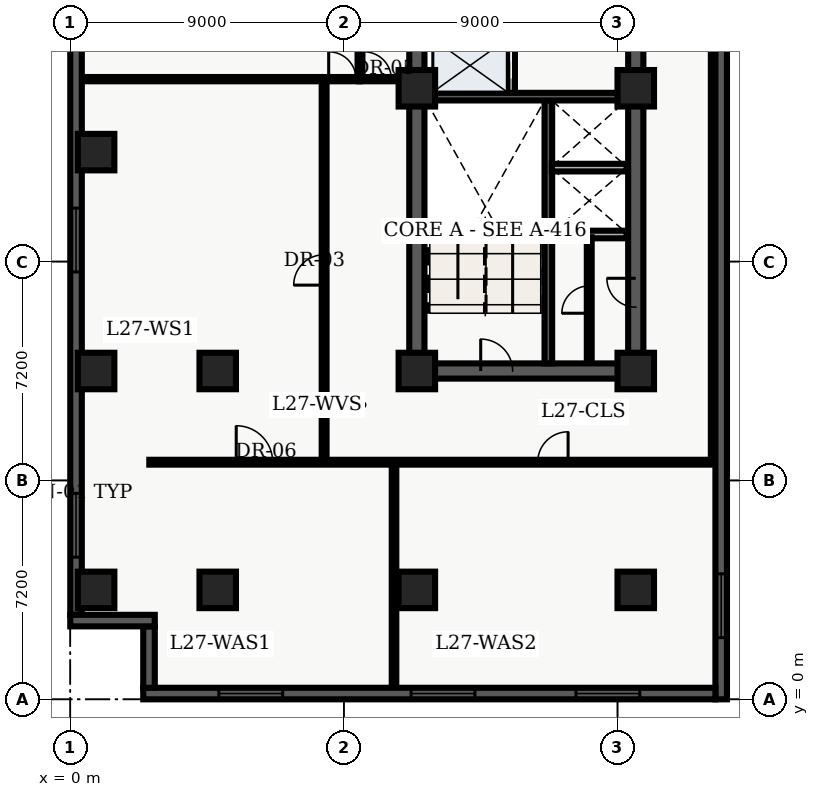
"""IFC4 building model, lengths in metres.
Left out: names, types, materials, properties, quantities, classifications, styles, units other than length and angle.
Written with IfcOpenShell. Run it as: python <this file> out.ifc"""

import sys

from ifc_helpers import new_model, entity, si_unit, converted_unit, direction, frame, origin_with_axes, origin_2d_with_axis, place, context, subcontext, project, spatial, polyline, rectangle, outline, extrude, element, fill, save


model = new_model("IFC4")
c1 = context("Model", 3, precision=1e-05, world=origin_with_axes(), true_north=direction((0.0, 1.0)))
c2 = subcontext(c1, "Body", "Model", "MODEL_VIEW")
j1 = project(units=[si_unit("LENGTHUNIT", "METRE"), converted_unit("PLANEANGLEUNIT", "DEGREE", entity("IfcPlaneAngleMeasure", 0.017), si_unit("PLANEANGLEUNIT", "RADIAN"), dimensions=[0, 0, 0, 0, 0, 0, 0])], contexts=[c1])
p1 = place(None, origin_with_axes())
s1 = spatial("IfcSite", under=j1, at=p1, CompositionType="ELEMENT")
p2 = place(p1, origin_with_axes())
s2 = spatial("IfcBuilding", under=s1, at=p2, CompositionType="ELEMENT")
p3 = place(p2, frame((0.0, 0.0, 112.5), z_axis=(0.0, 0.0, 1.0), x_axis=(1.0, 0.0, 0.0)))
s3 = spatial("IfcBuildingStorey", under=s2, at=p3, CompositionType="ELEMENT", Elevation=112.5)
p4 = place(p3, frame((11.4, 10.8, 0.0), z_axis=(0.0, 0.0, 1.0), x_axis=(0.0, 1.0, 0.0)))
e1 = element("IfcWall", 1, at=p4, inside=s3, PredefinedType="SHEAR", context=c2, shape_type="SweptSolid", body=[
    extrude(outline(polyline([(0.0, -0.25), (27.0, -0.25), (27.0, 0.25), (0.0, 0.25), (0.0, -0.25)])), origin_with_axes(), (0.0, 0.0, 1.0), 3.66),
])
p5 = place(p3, frame((11.4, 10.8, 0.0), z_axis=(0.0, 0.0, 1.0), x_axis=(1.0, 0.0, 0.0)))
e2 = element("IfcWall", 2, at=p5, inside=s3, PredefinedType="SHEAR", context=c2, shape_type="SweptSolid", body=[
    extrude(outline(polyline([(0.0, -0.25), (7.2, -0.25), (7.2, 0.25), (0.0, 0.25), (0.0, -0.25)])), origin_with_axes(), (0.0, 0.0, 1.0), 3.66),
])
p6 = place(p5, frame((2.625, 0.0, 0.0), z_axis=(0.0, 0.0, 1.0), x_axis=(1.0, 0.0, 0.0)))
e3 = element("IfcOpeningElement", 3, at=p6, cuts=e2, PredefinedType="OPENING", context=c2, shape_type="SweptSolid", body=[
    extrude(rectangle(XDim=1.05, YDim=0.52, at=origin_2d_with_axis()), origin_with_axes(), (0.0, 0.0, 1.0), 2.15),
])
p7 = place(p3, frame((18.6, 10.8, 0.0), z_axis=(0.0, 0.0, 1.0), x_axis=(0.0, 1.0, 0.0)))
e4 = element("IfcWall", 4, at=p7, inside=s3, PredefinedType="SHEAR", context=c2, shape_type="SweptSolid", body=[
    extrude(outline(polyline([(0.0, -0.25), (13.5, -0.25), (13.5, 0.25), (0.0, 0.25), (0.0, -0.25)])), origin_with_axes(), (0.0, 0.0, 1.0), 3.66),
])
p8 = place(p7, frame((11.125, 0.0, 0.0), z_axis=(0.0, 0.0, 1.0), x_axis=(1.0, 0.0, 0.0)))
e5 = element("IfcOpeningElement", 5, at=p8, cuts=e4, PredefinedType="OPENING", context=c2, shape_type="SweptSolid", body=[
    extrude(rectangle(XDim=1.05, YDim=0.52, at=origin_2d_with_axis()), origin_with_axes(), (0.0, 0.0, 1.0), 2.15),
])
p9 = place(p7, frame((2.575, 0.0, 0.0), z_axis=(0.0, 0.0, 1.0), x_axis=(1.0, 0.0, 0.0)))
e6 = element("IfcOpeningElement", 6, at=p9, cuts=e4, PredefinedType="OPENING", context=c2, shape_type="SweptSolid", body=[
    extrude(rectangle(XDim=0.95, YDim=0.52, at=origin_2d_with_axis()), origin_with_axes(), (0.0, 0.0, 1.0), 2.15),
])
p10 = place(p3, frame((15.725, 11.05, 0.0), z_axis=(0.0, 0.0, 1.0), x_axis=(0.0, 1.0, 0.0)))
e7 = element("IfcWall", 7, at=p10, inside=s3, PredefinedType="SHEAR", context=c2, shape_type="SweptSolid", body=[
    extrude(outline(polyline([(0.0, -0.125), (8.65, -0.125), (8.65, 0.125), (0.0, 0.125), (0.0, -0.125)])), origin_with_axes(), (0.0, 0.0, 1.0), 3.66),
])
p11 = place(p3, frame((11.65, 19.825, 0.0), z_axis=(0.0, 0.0, 1.0), x_axis=(1.0, 0.0, 0.0)))
e8 = element("IfcWall", 8, at=p11, inside=s3, PredefinedType="SHEAR", context=c2, shape_type="SweptSolid", body=[
    extrude(outline(polyline([(0.0, -0.125), (6.7, -0.125), (6.7, 0.125), (0.0, 0.125), (0.0, -0.125)])), origin_with_axes(), (0.0, 0.0, 1.0), 3.66),
])
p12 = place(p3, frame((14.5, 19.95, 0.0), z_axis=(0.0, 0.0, 1.0), x_axis=(0.0, 1.0, 0.0)))
e9 = element("IfcWall", 9, at=p12, inside=s3, PredefinedType="SOLIDWALL", context=c2, shape_type="SweptSolid", body=[
    extrude(outline(polyline([(0.0, -0.125), (6.25, -0.125), (6.25, 0.125), (0.0, 0.125), (0.0, -0.125)])), origin_with_axes(), (0.0, 0.0, 1.0), 2.7),
])
p13 = place(p12, frame((1.025, 0.0, 0.0), z_axis=(0.0, 0.0, 1.0), x_axis=(1.0, 0.0, 0.0)))
e10 = element("IfcOpeningElement", 10, at=p13, cuts=e9, PredefinedType="OPENING", context=c2, shape_type="SweptSolid", body=[
    extrude(rectangle(XDim=1.1, YDim=0.27, at=origin_2d_with_axis()), origin_with_axes(), (0.0, 0.0, 1.0), 2.15),
])
p14 = place(p12, frame((2.975, 0.0, 0.0), z_axis=(0.0, 0.0, 1.0), x_axis=(1.0, 0.0, 0.0)))
e11 = element("IfcOpeningElement", 11, at=p14, cuts=e9, PredefinedType="OPENING", context=c2, shape_type="SweptSolid", body=[
    extrude(rectangle(XDim=1.1, YDim=0.27, at=origin_2d_with_axis()), origin_with_axes(), (0.0, 0.0, 1.0), 2.15),
])
p15 = place(p12, frame((5.425, 0.0, 0.0), z_axis=(0.0, 0.0, 1.0), x_axis=(1.0, 0.0, 0.0)))
e12 = element("IfcOpeningElement", 12, at=p15, cuts=e9, PredefinedType="OPENING", context=c2, shape_type="SweptSolid", body=[
    extrude(rectangle(XDim=1.2, YDim=0.27, at=origin_2d_with_axis()), origin_with_axes(), (0.0, 0.0, 1.0), 2.15),
])
for number, where, z_axis, x_axis in (
    (13, (11.4, 3.6, 0.0), (0.0, 0.0, 1.0), (1.0, 0.0, 0.0)),
    (14, (11.4, 10.8, 0.0), (0.0, 0.0, 1.0), (1.0, 0.0, 0.0)),
    (15, (11.4, 20.1, 0.0), (0.0, 0.0, 1.0), (1.0, 0.0, 0.0)),
    (16, (18.6, 3.6, 0.0), (0.0, 0.0, 1.0), (1.0, 0.0, 0.0)),
    (17, (18.6, 10.8, 0.0), (0.0, 0.0, 1.0), (1.0, 0.0, 0.0)),
    (18, (18.6, 20.1, 0.0), (0.0, 0.0, 1.0), (1.0, 0.0, 0.0)),
    (19, (4.85, 3.6, 0.0), (0.0, 0.0, 1.0), (1.0, 0.0, 0.0)),
    (20, (4.85, 10.8, 0.0), (0.0, 0.0, 1.0), (1.0, 0.0, 0.0)),
    (21, (0.85, 3.6, 0.0), (0.0, 0.0, 1.0), (1.0, 0.0, 0.0)),
    (22, (0.85, 10.8, 0.0), (0.0, 0.0, 1.0), (1.0, 0.0, 0.0)),
    (23, (0.85, 18.0, 0.0), (0.0, 0.0, 1.0), (1.0, 0.0, 0.0)),
):
    element("IfcColumn", number, at=place(p3, frame(where, z_axis=z_axis, x_axis=x_axis)), inside=s3, PredefinedType="COLUMN", context=c2, shape_type="SweptSolid", body=[
        extrude(rectangle(XDim=1.2, YDim=1.2, at=origin_2d_with_axis()), origin_with_axes(), (0.0, 0.0, 1.0), 3.9),
    ])
for number, where, z_axis, x_axis in (
    (24, (15.84, 15.29, 0.0), (0.0, 0.0, 1.0), (1.0, 0.0, 0.0)),
    (25, (15.84, 17.49, 0.0), (0.0, 0.0, 1.0), (1.0, 0.0, 0.0)),
):
    element("IfcWall", number, at=place(p3, frame(where, z_axis=z_axis, x_axis=x_axis)), inside=s3, PredefinedType="SOLIDWALL", context=c2, shape_type="SweptSolid", body=[
        extrude(outline(polyline([(0.0, -0.125), (2.46, -0.125), (2.46, 0.125), (0.0, 0.125), (0.0, -0.125)])), origin_with_axes(), (0.0, 0.0, 1.0), 2.7),
    ])
p16 = place(p3, frame((17.07, 11.1, 0.0), z_axis=(0.0, 0.0, 1.0), x_axis=(0.0, 1.0, 0.0)))
e26 = element("IfcWall", 26, at=p16, inside=s3, PredefinedType="PARTITIONING", context=c2, shape_type="SweptSolid", body=[
    extrude(outline(polyline([(0.0, -0.08), (4.1, -0.08), (4.1, 0.08), (0.0, 0.08), (0.0, -0.08)])), origin_with_axes(), (0.0, 0.0, 1.0), 2.7),
])
p17 = place(p16, frame((2.05, 0.0, 0.0), z_axis=(0.0, 0.0, 1.0), x_axis=(1.0, 0.0, 0.0)))
e27 = element("IfcOpeningElement", 27, at=p17, cuts=e26, PredefinedType="OPENING", context=c2, shape_type="SweptSolid", body=[
    extrude(rectangle(XDim=0.9, YDim=0.18, at=origin_2d_with_axis()), origin_with_axes(), (0.0, 0.0, 1.0), 2.15),
])
p18 = place(p3, frame((9.52, 20.4, 0.0), z_axis=(0.0, 0.0, 1.0), x_axis=(0.0, 1.0, 0.0)))
e28 = element("IfcWall", 28, at=p18, inside=s3, PredefinedType="PARTITIONING", context=c2, shape_type="SweptSolid", body=[
    extrude(outline(polyline([(0.0, -0.07), (4.0, -0.07), (4.0, 0.07), (0.0, 0.07), (0.0, -0.07)])), origin_with_axes(), (0.0, 0.0, 1.0), 2.7),
])
p19 = place(p3, frame((9.52, 20.4, 0.0), z_axis=(0.0, 0.0, 1.0), x_axis=(1.0, 0.0, 0.0)))
e29 = element("IfcWall", 29, at=p19, inside=s3, PredefinedType="PARTITIONING", context=c2, shape_type="SweptSolid", body=[
    extrude(outline(polyline([(0.0, -0.07), (1.58, -0.07), (1.58, 0.07), (0.0, 0.07), (0.0, -0.07)])), origin_with_axes(), (0.0, 0.0, 1.0), 2.7),
])
p20 = place(p19, frame((0.59, 0.0, 0.0), z_axis=(0.0, 0.0, 1.0), x_axis=(1.0, 0.0, 0.0)))
e30 = element("IfcOpeningElement", 30, at=p20, cuts=e29, PredefinedType="OPENING", context=c2, shape_type="SweptSolid", body=[
    extrude(rectangle(XDim=0.9, YDim=0.16, at=origin_2d_with_axis()), origin_with_axes(), (0.0, 0.0, 1.0), 2.15),
])
p21 = place(p3, frame((2.6, 7.8, 0.0), z_axis=(0.0, 0.0, 1.0), x_axis=(1.0, 0.0, 0.0)))
e31 = element("IfcWall", 31, at=p21, inside=s3, PredefinedType="PARTITIONING", context=c2, shape_type="SweptSolid", body=[
    extrude(outline(polyline([(0.0, -0.08), (18.625, -0.08), (18.625, 0.08), (0.0, 0.08), (0.0, -0.08)])), origin_with_axes(), (0.0, 0.0, 1.0), 2.7),
])
p22 = place(p21, frame((3.459, 0.0, 0.0), z_axis=(0.0, 0.0, 1.0), x_axis=(1.0, 0.0, 0.0)))
e32 = element("IfcOpeningElement", 32, at=p22, cuts=e31, PredefinedType="OPENING", context=c2, shape_type="SweptSolid", body=[
    extrude(rectangle(XDim=1.2, YDim=0.18, at=origin_2d_with_axis()), origin_with_axes(), (0.0, 0.0, 1.0), 2.2),
])
p23 = place(p21, frame((13.274, 0.0, 0.0), z_axis=(0.0, 0.0, 1.0), x_axis=(1.0, 0.0, 0.0)))
e33 = element("IfcOpeningElement", 33, at=p23, cuts=e31, PredefinedType="OPENING", context=c2, shape_type="SweptSolid", body=[
    extrude(rectangle(XDim=1.0, YDim=0.18, at=origin_2d_with_axis()), origin_with_axes(), (0.0, 0.0, 1.0), 2.15),
])
p24 = place(p3, frame((21.15, 7.8, 0.0), z_axis=(0.0, 0.0, 1.0), x_axis=(0.0, 1.0, 0.0)))
e34 = element("IfcWall", 34, at=p24, inside=s3, PredefinedType="PARTITIONING", context=c2, shape_type="SweptSolid", body=[
    extrude(outline(polyline([(0.0, -0.08), (32.7, -0.08), (32.7, 0.08), (0.0, 0.08), (0.0, -0.08)])), origin_with_axes(), (0.0, 0.0, 1.0), 2.7),
])
p25 = place(p3, frame((8.35, 7.8, 0.0), z_axis=(0.0, 0.0, 1.0), x_axis=(0.0, 1.0, 0.0)))
e35 = element("IfcWall", 35, at=p25, inside=s3, PredefinedType="PARTITIONING", context=c2, shape_type="SweptSolid", body=[
    extrude(outline(polyline([(0.0, -0.08), (12.6, -0.08), (12.6, 0.08), (0.0, 0.08), (0.0, -0.08)])), origin_with_axes(), (0.0, 0.0, 1.0), 2.7),
])
p26 = place(p25, frame((6.325, 0.0, 0.0), z_axis=(0.0, 0.0, 1.0), x_axis=(1.0, 0.0, 0.0)))
e36 = element("IfcOpeningElement", 36, at=p26, cuts=e35, PredefinedType="OPENING", context=c2, shape_type="SweptSolid", body=[
    extrude(rectangle(XDim=1.0, YDim=0.18, at=origin_2d_with_axis()), origin_with_axes(), (0.0, 0.0, 1.0), 2.15),
])
p27 = place(p3, frame((0.36, 20.4, 0.0), z_axis=(0.0, 0.0, 1.0), x_axis=(1.0, 0.0, 0.0)))
e37 = element("IfcWall", 37, at=p27, inside=s3, PredefinedType="PARTITIONING", context=c2, shape_type="SweptSolid", body=[
    extrude(outline(polyline([(0.0, -0.07), (9.16, -0.07), (9.16, 0.07), (0.0, 0.07), (0.0, -0.07)])), origin_with_axes(), (0.0, 0.0, 1.0), 2.7),
])
p28 = place(p27, frame((8.59, 0.0, 0.0), z_axis=(0.0, 0.0, 1.0), x_axis=(1.0, 0.0, 0.0)))
e38 = element("IfcOpeningElement", 38, at=p28, cuts=e37, PredefinedType="OPENING", context=c2, shape_type="SweptSolid", body=[
    extrude(rectangle(XDim=0.9, YDim=0.16, at=origin_2d_with_axis()), origin_with_axes(), (0.0, 0.0, 1.0), 2.15),
])
p29 = place(p3, frame((10.649, 0.36, 0.0), z_axis=(0.0, 0.0, 1.0), x_axis=(0.0, 1.0, 0.0)))
e39 = element("IfcWall", 39, at=p29, inside=s3, PredefinedType="PARTITIONING", context=c2, shape_type="SweptSolid", body=[
    extrude(outline(polyline([(0.0, -0.075), (7.34, -0.075), (7.34, 0.075), (0.0, 0.075), (0.0, -0.075)])), origin_with_axes(), (0.0, 0.0, 1.0), 2.7),
])
p30 = place(p3, frame((0.19, 2.78, 0.0), z_axis=(0.0, 0.0, 1.0), x_axis=(0.0, 1.0, 0.0)))
e40 = element("IfcWall", 40, at=p30, inside=s3, PredefinedType="SOLIDWALL", context=c2, shape_type="SweptSolid", body=[
    extrude(outline(polyline([(0.0, -0.19), (43.42, -0.19), (43.42, 0.19), (0.0, 0.19), (0.0, -0.19)])), origin_with_axes(), (0.0, 0.0, 1.0), 3.66),
])
p31 = place(p30, frame((2.946, 0.0, 0.45), z_axis=(0.0, 0.0, 1.0), x_axis=(1.0, 0.0, 0.0)))
e41 = element("IfcOpeningElement", 41, at=p31, cuts=e40, PredefinedType="OPENING", context=c2, shape_type="SweptSolid", body=[
    extrude(rectangle(XDim=2.1, YDim=0.4, at=origin_2d_with_axis()), origin_with_axes(), (0.0, 0.0, 1.0), 2.2),
])
p32 = place(p30, frame((12.328, 0.0, 0.45), z_axis=(0.0, 0.0, 1.0), x_axis=(1.0, 0.0, 0.0)))
e42 = element("IfcOpeningElement", 42, at=p32, cuts=e40, PredefinedType="OPENING", context=c2, shape_type="SweptSolid", body=[
    extrude(rectangle(XDim=2.1, YDim=0.4, at=origin_2d_with_axis()), origin_with_axes(), (0.0, 0.0, 1.0), 2.2),
])
p33 = place(p30, frame((26.401, 0.0, 0.45), z_axis=(0.0, 0.0, 1.0), x_axis=(1.0, 0.0, 0.0)))
e43 = element("IfcOpeningElement", 43, at=p33, cuts=e40, PredefinedType="OPENING", context=c2, shape_type="SweptSolid", body=[
    extrude(rectangle(XDim=2.1, YDim=0.4, at=origin_2d_with_axis()), origin_with_axes(), (0.0, 0.0, 1.0), 2.2),
])
p34 = place(p30, frame((31.092, 0.0, 0.45), z_axis=(0.0, 0.0, 1.0), x_axis=(1.0, 0.0, 0.0)))
e44 = element("IfcOpeningElement", 44, at=p34, cuts=e40, PredefinedType="OPENING", context=c2, shape_type="SweptSolid", body=[
    extrude(rectangle(XDim=2.1, YDim=0.4, at=origin_2d_with_axis()), origin_with_axes(), (0.0, 0.0, 1.0), 2.2),
])
p35 = place(p30, frame((40.024, 0.0, 0.45), z_axis=(0.0, 0.0, 1.0), x_axis=(1.0, 0.0, 0.0)))
e45 = element("IfcOpeningElement", 45, at=p35, cuts=e40, PredefinedType="OPENING", context=c2, shape_type="SweptSolid", body=[
    extrude(rectangle(XDim=2.1, YDim=0.4, at=origin_2d_with_axis()), origin_with_axes(), (0.0, 0.0, 1.0), 2.2),
])
p36 = place(p3, frame((21.41, 45.82, 0.0), z_axis=(0.0, 0.0, 1.0), x_axis=(0.0, -1.0, 0.0)))
e46 = element("IfcWall", 46, at=p36, inside=s3, PredefinedType="SOLIDWALL", context=c2, shape_type="SweptSolid", body=[
    extrude(outline(polyline([(0.0, -0.19), (45.82, -0.19), (45.82, 0.19), (0.0, 0.19), (0.0, -0.19)])), origin_with_axes(), (0.0, 0.0, 1.0), 3.66),
])
p37 = place(p36, frame((3.079, 0.0, 0.45), z_axis=(0.0, 0.0, 1.0), x_axis=(1.0, 0.0, 0.0)))
e47 = element("IfcOpeningElement", 47, at=p37, cuts=e46, PredefinedType="OPENING", context=c2, shape_type="SweptSolid", body=[
    extrude(rectangle(XDim=2.1, YDim=0.4, at=origin_2d_with_axis()), origin_with_axes(), (0.0, 0.0, 1.0), 2.2),
])
p38 = place(p36, frame((42.741, 0.0, 0.45), z_axis=(0.0, 0.0, 1.0), x_axis=(1.0, 0.0, 0.0)))
e48 = element("IfcOpeningElement", 48, at=p38, cuts=e46, PredefinedType="OPENING", context=c2, shape_type="SweptSolid", body=[
    extrude(rectangle(XDim=2.1, YDim=0.4, at=origin_2d_with_axis()), origin_with_axes(), (0.0, 0.0, 1.0), 2.2),
])
p39 = place(p3, frame((21.22, 0.19, 0.0), z_axis=(0.0, 0.0, 1.0), x_axis=(-1.0, 0.0, 0.0)))
e49 = element("IfcWall", 49, at=p39, inside=s3, PredefinedType="SOLIDWALL", context=c2, shape_type="SweptSolid", body=[
    extrude(outline(polyline([(0.0, -0.19), (18.82, -0.19), (18.82, 0.19), (0.0, 0.19), (0.0, -0.19)])), origin_with_axes(), (0.0, 0.0, 1.0), 3.66),
])
p40 = place(p39, frame((3.537, 0.0, 0.45), z_axis=(0.0, 0.0, 1.0), x_axis=(1.0, 0.0, 0.0)))
e50 = element("IfcOpeningElement", 50, at=p40, cuts=e49, PredefinedType="OPENING", context=c2, shape_type="SweptSolid", body=[
    extrude(rectangle(XDim=2.1, YDim=0.4, at=origin_2d_with_axis()), origin_with_axes(), (0.0, 0.0, 1.0), 2.2),
])
p41 = place(p39, frame((8.96, 0.0, 0.45), z_axis=(0.0, 0.0, 1.0), x_axis=(1.0, 0.0, 0.0)))
e51 = element("IfcOpeningElement", 51, at=p41, cuts=e49, PredefinedType="OPENING", context=c2, shape_type="SweptSolid", body=[
    extrude(rectangle(XDim=2.1, YDim=0.4, at=origin_2d_with_axis()), origin_with_axes(), (0.0, 0.0, 1.0), 2.2),
])
p42 = place(p39, frame((15.283, 0.0, 0.45), z_axis=(0.0, 0.0, 1.0), x_axis=(1.0, 0.0, 0.0)))
e52 = element("IfcOpeningElement", 52, at=p42, cuts=e49, PredefinedType="OPENING", context=c2, shape_type="SweptSolid", body=[
    extrude(rectangle(XDim=2.1, YDim=0.4, at=origin_2d_with_axis()), origin_with_axes(), (0.0, 0.0, 1.0), 2.2),
])
p43 = place(p3, frame((2.59, 0.38, 0.0), z_axis=(0.0, 0.0, 1.0), x_axis=(0.0, 1.0, 0.0)))
e53 = element("IfcWall", 53, at=p43, inside=s3, PredefinedType="SOLIDWALL", context=c2, shape_type="SweptSolid", body=[
    extrude(outline(polyline([(0.0, -0.19), (2.02, -0.19), (2.02, 0.19), (0.0, 0.19), (0.0, -0.19)])), origin_with_axes(), (0.0, 0.0, 1.0), 3.66),
])
p44 = place(p3, frame((2.78, 2.59, 0.0), z_axis=(0.0, 0.0, 1.0), x_axis=(-1.0, 0.0, 0.0)))
e54 = element("IfcWall", 54, at=p44, inside=s3, PredefinedType="SOLIDWALL", context=c2, shape_type="SweptSolid", body=[
    extrude(outline(polyline([(0.0, -0.19), (2.78, -0.19), (2.78, 0.19), (0.0, 0.19), (0.0, -0.19)])), origin_with_axes(), (0.0, 0.0, 1.0), 3.66),
])
p45 = place(p12, frame((1.025, 0.0, 0.0), z_axis=(0.0, 0.0, 1.0), x_axis=(1.0, 0.0, 0.0)))
e55 = element("IfcDoor", 55, at=p45, inside=s3, OperationType="SLIDING_TO_LEFT", PredefinedType="DOOR", context=c2, shape_type="SweptSolid", body=[
    extrude(rectangle(XDim=1.1, YDim=0.09, at=origin_2d_with_axis()), origin_with_axes(), (0.0, 0.0, 1.0), 2.15),
])
fill(e10, e55)
p46 = place(p5, frame((2.625, 0.0, 0.0), z_axis=(0.0, 0.0, 1.0), x_axis=(1.0, 0.0, 0.0)))
e56 = element("IfcDoor", 56, at=p46, inside=s3, OperationType="SINGLE_SWING_LEFT", PredefinedType="DOOR", context=c2, shape_type="SweptSolid", body=[
    extrude(rectangle(XDim=1.05, YDim=0.09, at=origin_2d_with_axis()), origin_with_axes(), (0.0, 0.0, 1.0), 2.15),
])
fill(e3, e56)
p47 = place(p16, frame((2.05, 0.0, 0.0), z_axis=(0.0, 0.0, 1.0), x_axis=(1.0, 0.0, 0.0)))
e57 = element("IfcDoor", 57, at=p47, inside=s3, OperationType="SINGLE_SWING_LEFT", PredefinedType="DOOR", context=c2, shape_type="SweptSolid", body=[
    extrude(rectangle(XDim=0.9, YDim=0.09, at=origin_2d_with_axis()), origin_with_axes(), (0.0, 0.0, 1.0), 2.15),
])
fill(e27, e57)
p48 = place(p7, frame((2.575, 0.0, 0.0), z_axis=(0.0, 0.0, 1.0), x_axis=(1.0, 0.0, 0.0)))
e58 = element("IfcDoor", 58, at=p48, inside=s3, OperationType="SINGLE_SWING_RIGHT", PredefinedType="DOOR", context=c2, shape_type="SweptSolid", body=[
    extrude(rectangle(XDim=0.95, YDim=0.09, at=origin_2d_with_axis()), origin_with_axes(), (0.0, 0.0, 1.0), 2.15),
])
fill(e6, e58)
p49 = place(p19, frame((0.59, 0.0, 0.0), z_axis=(0.0, 0.0, 1.0), x_axis=(1.0, 0.0, 0.0)))
e59 = element("IfcDoor", 59, at=p49, inside=s3, OperationType="SINGLE_SWING_LEFT", PredefinedType="DOOR", context=c2, shape_type="SweptSolid", body=[
    extrude(rectangle(XDim=0.9, YDim=0.084, at=origin_2d_with_axis()), origin_with_axes(), (0.0, 0.0, 1.0), 2.15),
])
fill(e30, e59)
p50 = place(p27, frame((8.59, 0.0, 0.0), z_axis=(0.0, 0.0, 1.0), x_axis=(1.0, 0.0, 0.0)))
e60 = element("IfcDoor", 60, at=p50, inside=s3, OperationType="SINGLE_SWING_LEFT", PredefinedType="DOOR", context=c2, shape_type="SweptSolid", body=[
    extrude(rectangle(XDim=0.9, YDim=0.084, at=origin_2d_with_axis()), origin_with_axes(), (0.0, 0.0, 1.0), 2.15),
])
fill(e38, e60)
p51 = place(p25, frame((6.325, 0.0, 0.0), z_axis=(0.0, 0.0, 1.0), x_axis=(1.0, 0.0, 0.0)))
e61 = element("IfcDoor", 61, at=p51, inside=s3, OperationType="SINGLE_SWING_LEFT", PredefinedType="DOOR", context=c2, shape_type="SweptSolid", body=[
    extrude(rectangle(XDim=1.0, YDim=0.09, at=origin_2d_with_axis()), origin_with_axes(), (0.0, 0.0, 1.0), 2.15),
])
fill(e36, e61)
p52 = place(p21, frame((3.459, 0.0, 0.0), z_axis=(0.0, 0.0, 1.0), x_axis=(1.0, 0.0, 0.0)))
e62 = element("IfcDoor", 62, at=p52, inside=s3, OperationType="SINGLE_SWING_LEFT", PredefinedType="DOOR", context=c2, shape_type="SweptSolid", body=[
    extrude(rectangle(XDim=1.2, YDim=0.09, at=origin_2d_with_axis()), origin_with_axes(), (0.0, 0.0, 1.0), 2.2),
])
fill(e32, e62)
p53 = place(p21, frame((13.274, 0.0, 0.0), z_axis=(0.0, 0.0, 1.0), x_axis=(1.0, 0.0, 0.0)))
e63 = element("IfcDoor", 63, at=p53, inside=s3, OperationType="SINGLE_SWING_RIGHT", PredefinedType="DOOR", context=c2, shape_type="SweptSolid", body=[
    extrude(rectangle(XDim=1.0, YDim=0.09, at=origin_2d_with_axis()), origin_with_axes(), (0.0, 0.0, 1.0), 2.15),
])
fill(e33, e63)
p54 = place(p30, frame((2.946, 0.0, 0.45), z_axis=(0.0, 0.0, 1.0), x_axis=(1.0, 0.0, 0.0)))
e64 = element("IfcWindow", 64, at=p54, inside=s3, PredefinedType="WINDOW", context=c2, shape_type="SweptSolid", body=[
    extrude(rectangle(XDim=2.1, YDim=0.09, at=origin_2d_with_axis()), origin_with_axes(), (0.0, 0.0, 1.0), 2.2),
])
fill(e41, e64)
p55 = place(p30, frame((12.328, 0.0, 0.45), z_axis=(0.0, 0.0, 1.0), x_axis=(1.0, 0.0, 0.0)))
e65 = element("IfcWindow", 65, at=p55, inside=s3, PredefinedType="WINDOW", context=c2, shape_type="SweptSolid", body=[
    extrude(rectangle(XDim=2.1, YDim=0.09, at=origin_2d_with_axis()), origin_with_axes(), (0.0, 0.0, 1.0), 2.2),
])
fill(e42, e65)
p56 = place(p36, frame((42.741, 0.0, 0.45), z_axis=(0.0, 0.0, 1.0), x_axis=(1.0, 0.0, 0.0)))
e66 = element("IfcWindow", 66, at=p56, inside=s3, PredefinedType="WINDOW", context=c2, shape_type="SweptSolid", body=[
    extrude(rectangle(XDim=2.1, YDim=0.09, at=origin_2d_with_axis()), origin_with_axes(), (0.0, 0.0, 1.0), 2.2),
])
fill(e48, e66)
p57 = place(p39, frame((3.537, 0.0, 0.45), z_axis=(0.0, 0.0, 1.0), x_axis=(1.0, 0.0, 0.0)))
e67 = element("IfcWindow", 67, at=p57, inside=s3, PredefinedType="WINDOW", context=c2, shape_type="SweptSolid", body=[
    extrude(rectangle(XDim=2.1, YDim=0.09, at=origin_2d_with_axis()), origin_with_axes(), (0.0, 0.0, 1.0), 2.2),
])
fill(e50, e67)
p58 = place(p39, frame((8.96, 0.0, 0.45), z_axis=(0.0, 0.0, 1.0), x_axis=(1.0, 0.0, 0.0)))
e68 = element("IfcWindow", 68, at=p58, inside=s3, PredefinedType="WINDOW", context=c2, shape_type="SweptSolid", body=[
    extrude(rectangle(XDim=2.1, YDim=0.09, at=origin_2d_with_axis()), origin_with_axes(), (0.0, 0.0, 1.0), 2.2),
])
fill(e51, e68)
p59 = place(p39, frame((15.283, 0.0, 0.45), z_axis=(0.0, 0.0, 1.0), x_axis=(1.0, 0.0, 0.0)))
e69 = element("IfcWindow", 69, at=p59, inside=s3, PredefinedType="WINDOW", context=c2, shape_type="SweptSolid", body=[
    extrude(rectangle(XDim=2.1, YDim=0.09, at=origin_2d_with_axis()), origin_with_axes(), (0.0, 0.0, 1.0), 2.2),
])
fill(e52, e69)
save(model, sys.argv[1])
